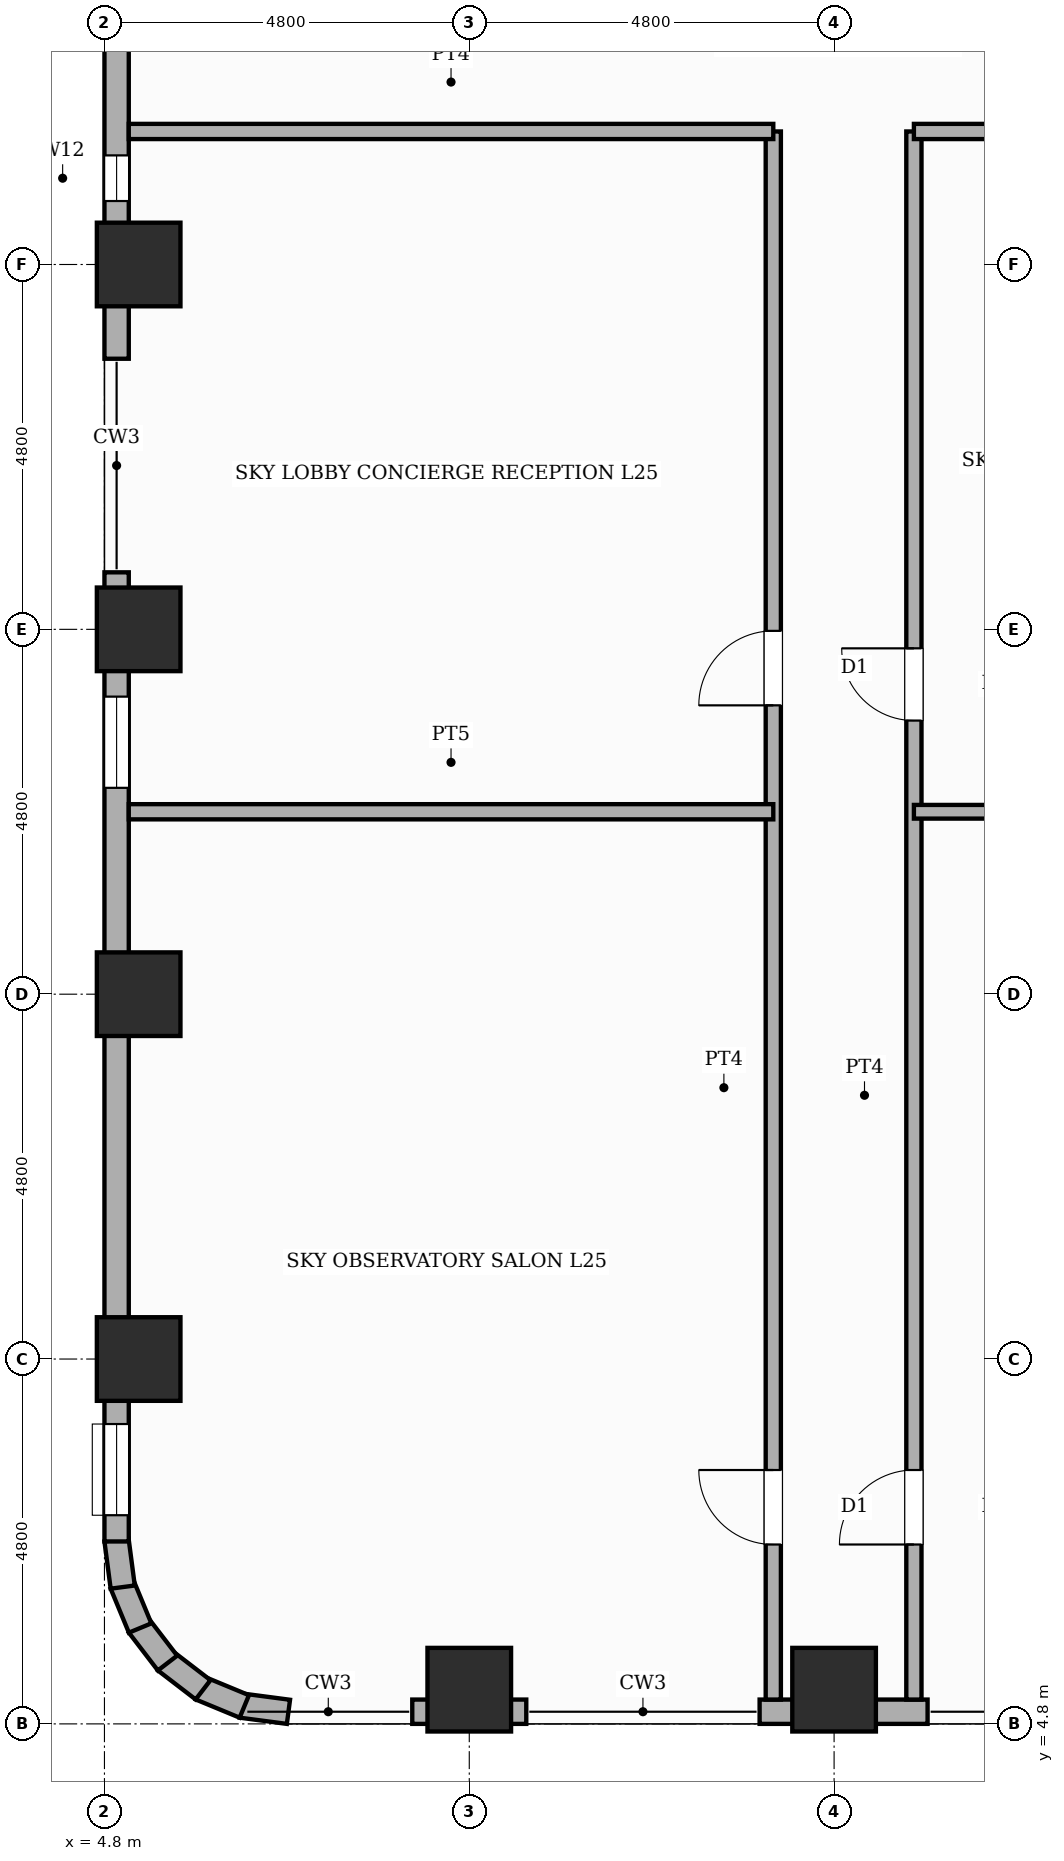
"""IFC4 building model, lengths in metres.
Left out: names, types, materials, properties, quantities, classifications, styles, units other than length and angle.
Written with IfcOpenShell. Run it as: python <this file> out.ifc"""

import sys

from ifc_helpers import new_model, si_unit, direction, frame, frame_2d, origin, origin_2d, place, context, subcontext, project, spatial, rectangle, extrude, element, fill, save


model = new_model("IFC4")
c1 = context("Model", 3, precision=1e-05, world=origin(), true_north=direction((0.0, 1.0)))
c2 = subcontext(c1, "Body", "Model", "MODEL_VIEW")
j1 = project(units=[si_unit("LENGTHUNIT", "METRE"), si_unit("PLANEANGLEUNIT", "RADIAN")], contexts=[c1])
p1 = place(None, origin())
s1 = spatial("IfcSite", under=j1, at=p1, CompositionType="ELEMENT")
p2 = place(p1, origin())
s2 = spatial("IfcBuilding", under=s1, at=p2, CompositionType="ELEMENT")
p3 = place(p2, frame((0.0, 0.0, 97.0)))
s3 = spatial("IfcBuildingStorey", under=s2, at=p3, CompositionType="ELEMENT", Elevation=97.0)
for number, where, z_axis, x_axis in (
    (1, (5.25, 9.6, 0.0), (0.0, 0.0, 1.0), (1.0, 0.0, 0.0)),
    (2, (5.25, 14.4, 0.0), (0.0, 0.0, 1.0), (1.0, 0.0, 0.0)),
    (3, (5.25, 19.2, 0.0), (0.0, 0.0, 1.0), (1.0, 0.0, 0.0)),
    (4, (5.25, 24.0, 0.0), (0.0, 0.0, 1.0), (1.0, 0.0, 0.0)),
    (5, (9.6, 5.25, 0.0), (0.0, 0.0, 1.0), (1.0, 0.0, 0.0)),
    (6, (14.4, 5.25, 0.0), (0.0, 0.0, 1.0), (1.0, 0.0, 0.0)),
):
    element("IfcColumn", number, at=place(p3, frame(where, z_axis=z_axis, x_axis=x_axis)), inside=s3, PredefinedType="COLUMN", context=c2, shape_type="SweptSolid", body=[
        extrude(rectangle(XDim=1.1, YDim=1.1, at=origin_2d()), origin(), (0.0, 0.0, 1.0), 4.8),
    ])
p4 = place(p3, frame((15.63, 4.96, 0.0), z_axis=(0.0, 0.0, 1.0), x_axis=(-1.0, 0.0, 0.0)))
e7 = element("IfcWall", 7, at=p4, inside=s3, PredefinedType="STANDARD", context=c2, shape_type="SweptSolid", body=[
    extrude(rectangle(XDim=2.21, YDim=0.32, at=frame_2d((1.105, 0.0))), origin(), (0.0, 0.0, 1.0), 3.68),
])
p5 = place(p3, frame((10.35, 4.96, 0.0), z_axis=(0.0, 0.0, 1.0), x_axis=(-1.0, 0.0, 0.0)))
e8 = element("IfcWall", 8, at=p5, inside=s3, PredefinedType="STANDARD", context=c2, shape_type="SweptSolid", body=[
    extrude(rectangle(XDim=1.5, YDim=0.32, at=frame_2d((0.75, 0.0))), origin(), (0.0, 0.0, 1.0), 3.68),
])
p6 = place(p3, frame((7.221, 4.958, 0.0), z_axis=(0.0, 0.0, 1.0), x_axis=(-0.991447664465, 0.130504898859, 0.0)))
e9 = element("IfcWall", 9, at=p6, inside=s3, PredefinedType="STANDARD", context=c2, shape_type="SweptSolid", body=[
    extrude(rectangle(XDim=0.627, YDim=0.32, at=frame_2d((0.313, 0.0))), origin(), (0.0, 0.0, 1.0), 4.5),
])
p7 = place(p3, frame((6.64, 5.03, 0.0), z_axis=(0.0, 0.0, 1.0), x_axis=(-0.923836271867, 0.382787856107, 0.0)))
e10 = element("IfcWall", 10, at=p7, inside=s3, PredefinedType="STANDARD", context=c2, shape_type="SweptSolid", body=[
    extrude(rectangle(XDim=0.626, YDim=0.32, at=frame_2d((0.313, 0.0))), origin(), (0.0, 0.0, 1.0), 4.5),
])
for number, where, z_axis, x_axis in (
    (11, (6.097, 5.248, 0.0), (0.0, 0.0, 1.0), (-0.793, 0.609, 0.0)),
    (12, (5.63, 5.6, 0.0), (0.0, 0.0, 1.0), (-0.609, 0.793, 0.0)),
):
    element("IfcWall", number, at=place(p3, frame(where, z_axis=z_axis, x_axis=x_axis)), inside=s3, PredefinedType="STANDARD", context=c2, shape_type="SweptSolid", body=[
        extrude(rectangle(XDim=0.627, YDim=0.32, at=frame_2d((0.313, 0.0))), origin(), (0.0, 0.0, 1.0), 4.5),
    ])
p8 = place(p3, frame((5.269, 6.061, 0.0), z_axis=(0.0, 0.0, 1.0), x_axis=(-0.382787856107, 0.923836271867, 0.0)))
e13 = element("IfcWall", 13, at=p8, inside=s3, PredefinedType="STANDARD", context=c2, shape_type="SweptSolid", body=[
    extrude(rectangle(XDim=0.626, YDim=0.32, at=frame_2d((0.313, 0.0))), origin(), (0.0, 0.0, 1.0), 4.5),
])
p9 = place(p3, frame((5.04, 6.6, 0.0), z_axis=(0.0, 0.0, 1.0), x_axis=(-0.130504898859, 0.991447664465, 0.0)))
e14 = element("IfcWall", 14, at=p9, inside=s3, PredefinedType="STANDARD", context=c2, shape_type="SweptSolid", body=[
    extrude(rectangle(XDim=0.627, YDim=0.32, at=frame_2d((0.313, 0.0))), origin(), (0.0, 0.0, 1.0), 4.5),
])
p10 = place(p3, frame((4.96, 7.2, 0.0), z_axis=(0.0, 0.0, 1.0), x_axis=(0.0, 1.0, 0.0)))
e15 = element("IfcWall", 15, at=p10, inside=s3, PredefinedType="STANDARD", context=c2, shape_type="SweptSolid", body=[
    extrude(rectangle(XDim=12.75, YDim=0.32, at=frame_2d((6.375, 0.0))), origin(), (0.0, 0.0, 1.0), 3.68),
])
p11 = place(p10, frame((0.345, 0.0, 0.8)))
e16 = element("IfcOpeningElement", 16, at=p11, cuts=e15, PredefinedType="OPENING", context=c2, shape_type="SweptSolid", body=[
    extrude(rectangle(XDim=1.2, YDim=1.8, at=frame_2d((0.6, 0.9))), frame((0.0, 0.17, 0.0), z_axis=(0.0, -1.0, 0.0), x_axis=(1.0, 0.0, 0.0)), (0.0, 0.0, 1.0), 0.34),
])
p12 = place(p10, frame((9.915, 0.0, 0.8)))
e17 = element("IfcOpeningElement", 17, at=p12, cuts=e15, PredefinedType="OPENING", context=c2, shape_type="SweptSolid", body=[
    extrude(rectangle(XDim=1.2, YDim=1.8, at=frame_2d((0.6, 0.9))), frame((0.0, 0.17, 0.0), z_axis=(0.0, -1.0, 0.0), x_axis=(1.0, 0.0, 0.0)), (0.0, 0.0, 1.0), 0.34),
])
p13 = place(p3, frame((4.96, 22.76, 0.0), z_axis=(0.0, 0.0, 1.0), x_axis=(0.0, 1.0, 0.0)))
e18 = element("IfcWall", 18, at=p13, inside=s3, PredefinedType="STANDARD", context=c2, shape_type="SweptSolid", body=[
    extrude(rectangle(XDim=22.84, YDim=0.32, at=frame_2d((11.42, 0.0))), origin(), (0.0, 0.0, 1.0), 3.68),
])
p14 = place(p13, frame((2.075, 0.0, 0.45)))
e19 = element("IfcOpeningElement", 19, at=p14, cuts=e18, PredefinedType="OPENING", context=c2, shape_type="SweptSolid", body=[
    extrude(rectangle(XDim=0.6, YDim=1.8, at=frame_2d((0.3, 0.9))), frame((0.0, 0.17, 0.0), z_axis=(0.0, -1.0, 0.0), x_axis=(1.0, 0.0, 0.0)), (0.0, 0.0, 1.0), 0.34),
])
p15 = place(p3, frame((13.6, 5.12, 0.0), z_axis=(0.0, 0.0, 1.0), x_axis=(0.0, 1.0, 0.0)))
e20 = element("IfcWall", 20, at=p15, inside=s3, PredefinedType="PARTITIONING", context=c2, shape_type="SweptSolid", body=[
    extrude(rectangle(XDim=20.63, YDim=0.2, at=frame_2d((10.315, 0.0))), origin(), (0.0, 0.0, 1.0), 4.5),
])
p16 = place(p15, frame((13.08, 0.0, 0.0)))
e21 = element("IfcOpeningElement", 21, at=p16, cuts=e20, PredefinedType="OPENING", context=c2, shape_type="SweptSolid", body=[
    extrude(rectangle(XDim=0.98, YDim=2.18, at=frame_2d((0.49, 1.09))), frame((0.0, 0.11, 0.0), z_axis=(0.0, -1.0, 0.0), x_axis=(1.0, 0.0, 0.0)), (0.0, 0.0, 1.0), 0.22),
])
p17 = place(p15, frame((2.04, 0.0, 0.0)))
e22 = element("IfcOpeningElement", 22, at=p17, cuts=e20, PredefinedType="OPENING", context=c2, shape_type="SweptSolid", body=[
    extrude(rectangle(XDim=0.98, YDim=2.18, at=frame_2d((0.49, 1.09))), frame((0.0, 0.11, 0.0), z_axis=(0.0, -1.0, 0.0), x_axis=(1.0, 0.0, 0.0)), (0.0, 0.0, 1.0), 0.22),
])
p18 = place(p3, frame((15.45, 5.12, 0.0), z_axis=(0.0, 0.0, 1.0), x_axis=(0.0, 1.0, 0.0)))
e23 = element("IfcWall", 23, at=p18, inside=s3, PredefinedType="PARTITIONING", context=c2, shape_type="SweptSolid", body=[
    extrude(rectangle(XDim=20.63, YDim=0.2, at=frame_2d((10.315, 0.0))), origin(), (0.0, 0.0, 1.0), 4.5),
])
p19 = place(p18, frame((2.04, 0.0, 0.0)))
e24 = element("IfcOpeningElement", 24, at=p19, cuts=e23, PredefinedType="OPENING", context=c2, shape_type="SweptSolid", body=[
    extrude(rectangle(XDim=0.98, YDim=2.18, at=frame_2d((0.49, 1.09))), frame((0.0, 0.11, 0.0), z_axis=(0.0, -1.0, 0.0), x_axis=(1.0, 0.0, 0.0)), (0.0, 0.0, 1.0), 0.22),
])
p20 = place(p18, frame((12.88, 0.0, 0.0)))
e25 = element("IfcOpeningElement", 25, at=p20, cuts=e23, PredefinedType="OPENING", context=c2, shape_type="SweptSolid", body=[
    extrude(rectangle(XDim=0.95, YDim=2.15, at=frame_2d((0.475, 1.075))), frame((0.0, 0.11, 0.0), z_axis=(0.0, -1.0, 0.0), x_axis=(1.0, 0.0, 0.0)), (0.0, 0.0, 1.0), 0.22),
])
p21 = place(p3, frame((5.12, 25.75, 0.0), z_axis=(0.0, 0.0, 1.0), x_axis=(1.0, 0.0, 0.0)))
e26 = element("IfcWall", 26, at=p21, inside=s3, PredefinedType="PARTITIONING", context=c2, shape_type="SweptSolid", body=[
    extrude(rectangle(XDim=8.48, YDim=0.2, at=frame_2d((4.24, 0.0))), origin(), (0.0, 0.0, 1.0), 4.5),
])
p22 = place(p3, frame((15.45, 25.75, 0.0), z_axis=(0.0, 0.0, 1.0), x_axis=(1.0, 0.0, 0.0)))
e27 = element("IfcWall", 27, at=p22, inside=s3, PredefinedType="PARTITIONING", context=c2, shape_type="SweptSolid", body=[
    extrude(rectangle(XDim=8.23, YDim=0.2, at=frame_2d((4.115, 0.0))), origin(), (0.0, 0.0, 1.0), 4.5),
])
p23 = place(p3, frame((5.12, 16.8, 0.0), z_axis=(0.0, 0.0, 1.0), x_axis=(1.0, 0.0, 0.0)))
e28 = element("IfcWall", 28, at=p23, inside=s3, PredefinedType="SOLIDWALL", context=c2, shape_type="SweptSolid", body=[
    extrude(rectangle(XDim=8.48, YDim=0.2, at=frame_2d((4.24, 0.0))), origin(), (0.0, 0.0, 1.0), 4.13),
])
p24 = place(p3, frame((15.45, 16.8, 0.0), z_axis=(0.0, 0.0, 1.0), x_axis=(1.0, 0.0, 0.0)))
e29 = element("IfcWall", 29, at=p24, inside=s3, PredefinedType="PLUMBINGWALL", context=c2, shape_type="SweptSolid", body=[
    extrude(rectangle(XDim=8.23, YDim=0.18, at=frame_2d((4.115, 0.0))), origin(), (0.0, 0.0, 1.0), 4.13),
])
p25 = place(p24, frame((5.07, 0.0, 0.0)))
e30 = element("IfcOpeningElement", 30, at=p25, cuts=e29, PredefinedType="OPENING", context=c2, shape_type="SweptSolid", body=[
    extrude(rectangle(XDim=1.04, YDim=2.15, at=frame_2d((0.52, 1.075))), frame((0.0, 0.1, 0.0), z_axis=(0.0, -1.0, 0.0), x_axis=(1.0, 0.0, 0.0)), (0.0, 0.0, 1.0), 0.2),
])
p26 = place(p11, origin())
e31 = element("IfcWindow", 31, at=p26, inside=s3, PartitioningType="SINGLE_PANEL", PredefinedType="WINDOW", context=c2, shape_type="SweptSolid", body=[
    extrude(rectangle(XDim=1.2, YDim=1.8, at=frame_2d((0.6, 0.9))), frame((0.0, 0.03, 0.0), z_axis=(0.0, -1.0, 0.0), x_axis=(1.0, 0.0, 0.0)), (0.0, 0.0, 1.0), 0.06),
])
fill(e16, e31)
p27 = place(p12, origin())
e32 = element("IfcWindow", 32, at=p27, inside=s3, PartitioningType="SINGLE_PANEL", PredefinedType="WINDOW", context=c2, shape_type="SweptSolid", body=[
    extrude(rectangle(XDim=1.2, YDim=1.8, at=frame_2d((0.6, 0.9))), frame((0.0, 0.03, 0.0), z_axis=(0.0, -1.0, 0.0), x_axis=(1.0, 0.0, 0.0)), (0.0, 0.0, 1.0), 0.06),
])
fill(e17, e32)
p28 = place(p14, origin())
e33 = element("IfcWindow", 33, at=p28, inside=s3, PartitioningType="SINGLE_PANEL", PredefinedType="WINDOW", context=c2, shape_type="SweptSolid", body=[
    extrude(rectangle(XDim=0.6, YDim=1.8, at=frame_2d((0.3, 0.9))), frame((0.0, 0.03, 0.0), z_axis=(0.0, -1.0, 0.0), x_axis=(1.0, 0.0, 0.0)), (0.0, 0.0, 1.0), 0.06),
])
fill(e19, e33)
p29 = place(p16, origin())
e34 = element("IfcDoor", 34, at=p29, inside=s3, OperationType="SINGLE_SWING_LEFT", PredefinedType="DOOR", context=c2, shape_type="SweptSolid", body=[
    extrude(rectangle(XDim=0.98, YDim=2.18, at=frame_2d((0.49, 1.09))), frame((0.0, 0.025, 0.0), z_axis=(0.0, -1.0, 0.0), x_axis=(1.0, 0.0, 0.0)), (0.0, 0.0, 1.0), 0.05),
])
fill(e21, e34)
p30 = place(p17, origin())
e35 = element("IfcDoor", 35, at=p30, inside=s3, OperationType="SINGLE_SWING_RIGHT", PredefinedType="DOOR", context=c2, shape_type="SweptSolid", body=[
    extrude(rectangle(XDim=0.98, YDim=2.18, at=frame_2d((0.49, 1.09))), frame((0.0, 0.025, 0.0), z_axis=(0.0, -1.0, 0.0), x_axis=(1.0, 0.0, 0.0)), (0.0, 0.0, 1.0), 0.05),
])
fill(e22, e35)
p31 = place(p19, origin())
e36 = element("IfcDoor", 36, at=p31, inside=s3, OperationType="SINGLE_SWING_LEFT", PredefinedType="DOOR", context=c2, shape_type="SweptSolid", body=[
    extrude(rectangle(XDim=0.98, YDim=2.18, at=frame_2d((0.49, 1.09))), frame((0.0, 0.025, 0.0), z_axis=(0.0, -1.0, 0.0), x_axis=(1.0, 0.0, 0.0)), (0.0, 0.0, 1.0), 0.05),
])
fill(e24, e36)
p32 = place(p20, origin())
e37 = element("IfcDoor", 37, at=p32, inside=s3, OperationType="SINGLE_SWING_RIGHT", PredefinedType="DOOR", context=c2, shape_type="SweptSolid", body=[
    extrude(rectangle(XDim=0.95, YDim=2.15, at=frame_2d((0.475, 1.075))), frame((0.0, 0.025, 0.0), z_axis=(0.0, -1.0, 0.0), x_axis=(1.0, 0.0, 0.0)), (0.0, 0.0, 1.0), 0.05),
])
fill(e25, e37)
save(model, sys.argv[1])
